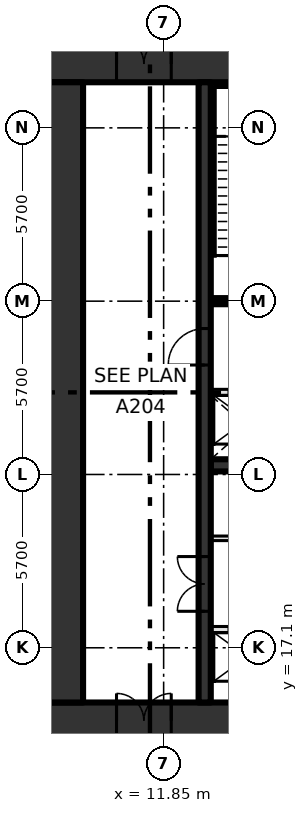
"""IFC4 building model, lengths in metres.
Left out: names, types, materials, properties, quantities, classifications, styles, units other than length and angle.
Written with IfcOpenShell. Run it as: python <this file> out.ifc"""

import sys

from ifc_helpers import new_model, si_unit, direction, frame, frame_2d, origin, place, context, subcontext, project, spatial, rectangle, extrude, element, fill, save


model = new_model("IFC4")
c1 = context("Model", 3, precision=1e-05, world=origin(), true_north=direction((0.0, 1.0)))
c2 = subcontext(c1, "Body", "Model", "MODEL_VIEW")
j1 = project(units=[si_unit("LENGTHUNIT", "METRE"), si_unit("PLANEANGLEUNIT", "RADIAN")], contexts=[c1])
p1 = place(None, origin())
s1 = spatial("IfcSite", under=j1, at=p1, CompositionType="ELEMENT")
p2 = place(p1, origin())
s2 = spatial("IfcBuilding", under=s1, at=p2, CompositionType="ELEMENT")
p3 = place(p2, frame((0.0, 0.0, 7.2)))
s3 = spatial("IfcBuildingStorey", under=s2, at=p3, CompositionType="ELEMENT", Elevation=7.2)
p4 = place(p3, frame((8.0, 14.7, -0.45), z_axis=(0.0, 0.0, 1.0), x_axis=(1.0, 0.0, 0.0)))
e1 = element("IfcWall", 1, at=p4, inside=s3, PredefinedType="SHEAR", context=c2, shape_type="SweptSolid", body=[
    extrude(rectangle(XDim=22.8, YDim=1.2, at=frame_2d((11.4, 0.0))), origin(), (0.0, 0.0, 1.0), 5.4),
])
p5 = place(p4, frame((2.3, 0.0, 0.45)))
e2 = element("IfcOpeningElement", 2, at=p5, cuts=e1, PredefinedType="OPENING", context=c2, shape_type="SweptSolid", body=[
    extrude(rectangle(XDim=1.8, YDim=2.1, at=frame_2d((0.9, 1.05))), frame((0.0, 0.61, 0.0), z_axis=(0.0, -1.0, 0.0), x_axis=(1.0, 0.0, 0.0)), (0.0, 0.0, 1.0), 1.22),
])
p6 = place(p3, frame((8.0, 36.3, -0.45), z_axis=(0.0, 0.0, 1.0), x_axis=(1.0, 0.0, 0.0)))
e3 = element("IfcWall", 3, at=p6, inside=s3, PredefinedType="SHEAR", context=c2, shape_type="SweptSolid", body=[
    extrude(rectangle(XDim=22.8, YDim=1.2, at=frame_2d((11.4, 0.0))), origin(), (0.0, 0.0, 1.0), 5.4),
])
p7 = place(p6, frame((2.3, 0.0, 0.45)))
e4 = element("IfcOpeningElement", 4, at=p7, cuts=e3, PredefinedType="OPENING", context=c2, shape_type="SweptSolid", body=[
    extrude(rectangle(XDim=1.8, YDim=2.1, at=frame_2d((0.9, 1.05))), frame((0.0, 0.61, 0.0), z_axis=(0.0, -1.0, 0.0), x_axis=(1.0, 0.0, 0.0)), (0.0, 0.0, 1.0), 1.22),
])
p8 = place(p3, frame((8.6, 15.3, -0.45), z_axis=(0.0, 0.0, 1.0), x_axis=(0.0, 1.0, 0.0)))
e5 = element("IfcWall", 5, at=p8, inside=s3, PredefinedType="SHEAR", context=c2, shape_type="SweptSolid", body=[
    extrude(rectangle(XDim=20.4, YDim=1.2, at=frame_2d((10.2, 0.0))), origin(), (0.0, 0.0, 1.0), 5.4),
])
p9 = place(p3, frame((13.4, 17.7, 0.0), z_axis=(0.0, 0.0, 1.0), x_axis=(1.0, 0.0, 0.0)))
e6 = element("IfcWall", 6, at=p9, inside=s3, PredefinedType="SOLIDWALL", context=c2, shape_type="SweptSolid", body=[
    extrude(rectangle(XDim=13.4, YDim=0.2, at=frame_2d((6.7, 0.0))), origin(), (0.0, 0.0, 1.0), 4.95),
])
p10 = place(p9, frame((0.6, 0.0, 0.0)))
e7 = element("IfcOpeningElement", 7, at=p10, cuts=e6, PredefinedType="OPENING", context=c2, shape_type="SweptSolid", body=[
    extrude(rectangle(XDim=1.1, YDim=2.1, at=frame_2d((0.55, 1.05))), frame((0.0, 0.11, 0.0), z_axis=(0.0, -1.0, 0.0), x_axis=(1.0, 0.0, 0.0)), (0.0, 0.0, 1.0), 0.22),
])
p11 = place(p9, frame((3.3, 0.0, 0.0)))
e8 = element("IfcOpeningElement", 8, at=p11, cuts=e6, PredefinedType="OPENING", context=c2, shape_type="SweptSolid", body=[
    extrude(rectangle(XDim=1.1, YDim=2.1, at=frame_2d((0.55, 1.05))), frame((0.0, 0.11, 0.0), z_axis=(0.0, -1.0, 0.0), x_axis=(1.0, 0.0, 0.0)), (0.0, 0.0, 1.0), 0.22),
])
p12 = place(p9, frame((6.0, 0.0, 0.0)))
e9 = element("IfcOpeningElement", 9, at=p12, cuts=e6, PredefinedType="OPENING", context=c2, shape_type="SweptSolid", body=[
    extrude(rectangle(XDim=1.1, YDim=2.1, at=frame_2d((0.55, 1.05))), frame((0.0, 0.11, 0.0), z_axis=(0.0, -1.0, 0.0), x_axis=(1.0, 0.0, 0.0)), (0.0, 0.0, 1.0), 0.22),
])
p13 = place(p9, frame((8.7, 0.0, 0.0)))
e10 = element("IfcOpeningElement", 10, at=p13, cuts=e6, PredefinedType="OPENING", context=c2, shape_type="SweptSolid", body=[
    extrude(rectangle(XDim=1.1, YDim=2.1, at=frame_2d((0.55, 1.05))), frame((0.0, 0.11, 0.0), z_axis=(0.0, -1.0, 0.0), x_axis=(1.0, 0.0, 0.0)), (0.0, 0.0, 1.0), 0.22),
])
p14 = place(p9, frame((11.4, 0.0, 0.0)))
e11 = element("IfcOpeningElement", 11, at=p14, cuts=e6, PredefinedType="OPENING", context=c2, shape_type="SweptSolid", body=[
    extrude(rectangle(XDim=1.1, YDim=2.1, at=frame_2d((0.55, 1.05))), frame((0.0, 0.11, 0.0), z_axis=(0.0, -1.0, 0.0), x_axis=(1.0, 0.0, 0.0)), (0.0, 0.0, 1.0), 0.22),
])
p15 = place(p3, frame((13.4, 20.7, 0.0), z_axis=(0.0, 0.0, 1.0), x_axis=(1.0, 0.0, 0.0)))
e12 = element("IfcWall", 12, at=p15, inside=s3, PredefinedType="PARTITIONING", context=c2, shape_type="SweptSolid", body=[
    extrude(rectangle(XDim=13.4, YDim=0.15, at=frame_2d((6.7, 0.0))), origin(), (0.0, 0.0, 1.0), 4.95),
])
p16 = place(p15, frame((2.05, 0.0, 0.0)))
e13 = element("IfcOpeningElement", 13, at=p16, cuts=e12, PredefinedType="OPENING", context=c2, shape_type="SweptSolid", body=[
    extrude(rectangle(XDim=0.9, YDim=2.1, at=frame_2d((0.45, 1.05))), frame((0.0, 0.085, 0.0), z_axis=(0.0, -1.0, 0.0), x_axis=(1.0, 0.0, 0.0)), (0.0, 0.0, 1.0), 0.17),
])
p17 = place(p15, frame((8.8, 0.0, 0.0)))
e14 = element("IfcOpeningElement", 14, at=p17, cuts=e12, PredefinedType="OPENING", context=c2, shape_type="SweptSolid", body=[
    extrude(rectangle(XDim=0.9, YDim=2.1, at=frame_2d((0.45, 1.05))), frame((0.0, 0.085, 0.0), z_axis=(0.0, -1.0, 0.0), x_axis=(1.0, 0.0, 0.0)), (0.0, 0.0, 1.0), 0.17),
])
p18 = place(p3, frame((13.4, 23.1, 0.0), z_axis=(0.0, 0.0, 1.0), x_axis=(1.0, 0.0, 0.0)))
e15 = element("IfcWall", 15, at=p18, inside=s3, PredefinedType="SHEAR", context=c2, shape_type="SweptSolid", body=[
    extrude(rectangle(XDim=16.2, YDim=0.4, at=frame_2d((8.1, 0.0))), origin(), (0.0, 0.0, 1.0), 4.95),
])
p19 = place(p3, frame((13.4, 25.5, 0.0), z_axis=(0.0, 0.0, 1.0), x_axis=(1.0, 0.0, 0.0)))
e16 = element("IfcWall", 16, at=p19, inside=s3, PredefinedType="SOLIDWALL", context=c2, shape_type="SweptSolid", body=[
    extrude(rectangle(XDim=16.2, YDim=0.2, at=frame_2d((8.1, 0.0))), origin(), (0.0, 0.0, 1.0), 4.95),
])
p20 = place(p19, frame((0.6, 0.0, 0.0)))
e17 = element("IfcOpeningElement", 17, at=p20, cuts=e16, PredefinedType="OPENING", context=c2, shape_type="SweptSolid", body=[
    extrude(rectangle(XDim=1.1, YDim=2.1, at=frame_2d((0.55, 1.05))), frame((0.0, 0.11, 0.0), z_axis=(0.0, -1.0, 0.0), x_axis=(1.0, 0.0, 0.0)), (0.0, 0.0, 1.0), 0.22),
])
p21 = place(p19, frame((3.3, 0.0, 0.0)))
e18 = element("IfcOpeningElement", 18, at=p21, cuts=e16, PredefinedType="OPENING", context=c2, shape_type="SweptSolid", body=[
    extrude(rectangle(XDim=1.1, YDim=2.1, at=frame_2d((0.55, 1.05))), frame((0.0, 0.11, 0.0), z_axis=(0.0, -1.0, 0.0), x_axis=(1.0, 0.0, 0.0)), (0.0, 0.0, 1.0), 0.22),
])
p22 = place(p19, frame((6.0, 0.0, 0.0)))
e19 = element("IfcOpeningElement", 19, at=p22, cuts=e16, PredefinedType="OPENING", context=c2, shape_type="SweptSolid", body=[
    extrude(rectangle(XDim=1.1, YDim=2.1, at=frame_2d((0.55, 1.05))), frame((0.0, 0.11, 0.0), z_axis=(0.0, -1.0, 0.0), x_axis=(1.0, 0.0, 0.0)), (0.0, 0.0, 1.0), 0.22),
])
p23 = place(p19, frame((8.7, 0.0, 0.0)))
e20 = element("IfcOpeningElement", 20, at=p23, cuts=e16, PredefinedType="OPENING", context=c2, shape_type="SweptSolid", body=[
    extrude(rectangle(XDim=1.1, YDim=2.1, at=frame_2d((0.55, 1.05))), frame((0.0, 0.11, 0.0), z_axis=(0.0, -1.0, 0.0), x_axis=(1.0, 0.0, 0.0)), (0.0, 0.0, 1.0), 0.22),
])
p24 = place(p3, frame((13.4, 28.5, 0.0), z_axis=(0.0, 0.0, 1.0), x_axis=(1.0, 0.0, 0.0)))
e21 = element("IfcWall", 21, at=p24, inside=s3, PredefinedType="SOLIDWALL", context=c2, shape_type="SweptSolid", body=[
    extrude(rectangle(XDim=6.7, YDim=0.2, at=frame_2d((3.35, 0.0))), origin(), (0.0, 0.0, 1.0), 4.95),
])
p25 = place(p24, frame((0.9, 0.0, 0.0)))
e22 = element("IfcOpeningElement", 22, at=p25, cuts=e21, PredefinedType="OPENING", context=c2, shape_type="SweptSolid", body=[
    extrude(rectangle(XDim=1.2, YDim=2.1, at=frame_2d((0.6, 1.05))), frame((0.0, 0.11, 0.0), z_axis=(0.0, -1.0, 0.0), x_axis=(1.0, 0.0, 0.0)), (0.0, 0.0, 1.0), 0.22),
])
p26 = place(p24, frame((3.7, 0.0, 0.0)))
e23 = element("IfcOpeningElement", 23, at=p26, cuts=e21, PredefinedType="OPENING", context=c2, shape_type="SweptSolid", body=[
    extrude(rectangle(XDim=1.1, YDim=2.1, at=frame_2d((0.55, 1.05))), frame((0.0, 0.11, 0.0), z_axis=(0.0, -1.0, 0.0), x_axis=(1.0, 0.0, 0.0)), (0.0, 0.0, 1.0), 0.22),
])
p27 = place(p3, frame((13.2, 15.3, 0.0), z_axis=(0.0, 0.0, 1.0), x_axis=(0.0, 1.0, 0.0)))
e24 = element("IfcWall", 24, at=p27, inside=s3, PredefinedType="SHEAR", context=c2, shape_type="SweptSolid", body=[
    extrude(rectangle(XDim=20.4, YDim=0.4, at=frame_2d((10.2, 0.0))), origin(), (0.0, 0.0, 1.0), 4.95),
])
p28 = place(p27, frame((3.0, 0.0, 0.0)))
e25 = element("IfcOpeningElement", 25, at=p28, cuts=e24, PredefinedType="OPENING", context=c2, shape_type="SweptSolid", body=[
    extrude(rectangle(XDim=1.8, YDim=2.1, at=frame_2d((0.9, 1.05))), frame((0.0, 0.21, 0.0), z_axis=(0.0, -1.0, 0.0), x_axis=(1.0, 0.0, 0.0)), (0.0, 0.0, 1.0), 0.42),
])
p29 = place(p27, frame((11.1, 0.0, 0.0)))
e26 = element("IfcOpeningElement", 26, at=p29, cuts=e24, PredefinedType="OPENING", context=c2, shape_type="SweptSolid", body=[
    extrude(rectangle(XDim=1.2, YDim=2.1, at=frame_2d((0.6, 1.05))), frame((0.0, 0.21, 0.0), z_axis=(0.0, -1.0, 0.0), x_axis=(1.0, 0.0, 0.0)), (0.0, 0.0, 1.0), 0.42),
])
p30 = place(p28, origin())
e27 = element("IfcDoor", 27, at=p30, inside=s3, OperationType="DOUBLE_DOOR_SINGLE_SWING", PredefinedType="DOOR", context=c2, shape_type="SweptSolid", body=[
    extrude(rectangle(XDim=1.8, YDim=2.1, at=frame_2d((0.9, 1.05))), frame((0.0, 0.025, 0.0), z_axis=(0.0, -1.0, 0.0), x_axis=(1.0, 0.0, 0.0)), (0.0, 0.0, 1.0), 0.05),
])
fill(e25, e27)
p31 = place(p29, origin())
e28 = element("IfcDoor", 28, at=p31, inside=s3, OperationType="SINGLE_SWING_LEFT", PredefinedType="DOOR", context=c2, shape_type="SweptSolid", body=[
    extrude(rectangle(XDim=1.2, YDim=2.1, at=frame_2d((0.6, 1.05))), frame((0.0, 0.025, 0.0), z_axis=(0.0, -1.0, 0.0), x_axis=(1.0, 0.0, 0.0)), (0.0, 0.0, 1.0), 0.05),
])
fill(e26, e28)
p32 = place(p7, origin())
e29 = element("IfcDoor", 29, at=p32, inside=s3, OperationType="DOUBLE_DOOR_SINGLE_SWING", PredefinedType="DOOR", context=c2, shape_type="SweptSolid", body=[
    extrude(rectangle(XDim=1.8, YDim=2.1, at=frame_2d((0.9, 1.05))), frame((0.0, 0.025, 0.0), z_axis=(0.0, -1.0, 0.0), x_axis=(1.0, 0.0, 0.0)), (0.0, 0.0, 1.0), 0.05),
])
fill(e4, e29)
p33 = place(p5, origin())
e30 = element("IfcDoor", 30, at=p33, inside=s3, OperationType="DOUBLE_DOOR_SINGLE_SWING", PredefinedType="DOOR", context=c2, shape_type="SweptSolid", body=[
    extrude(rectangle(XDim=1.8, YDim=2.1, at=frame_2d((0.9, 1.05))), frame((0.0, 0.025, 0.0), z_axis=(0.0, -1.0, 0.0), x_axis=(1.0, 0.0, 0.0)), (0.0, 0.0, 1.0), 0.05),
])
fill(e2, e30)
save(model, sys.argv[1])
